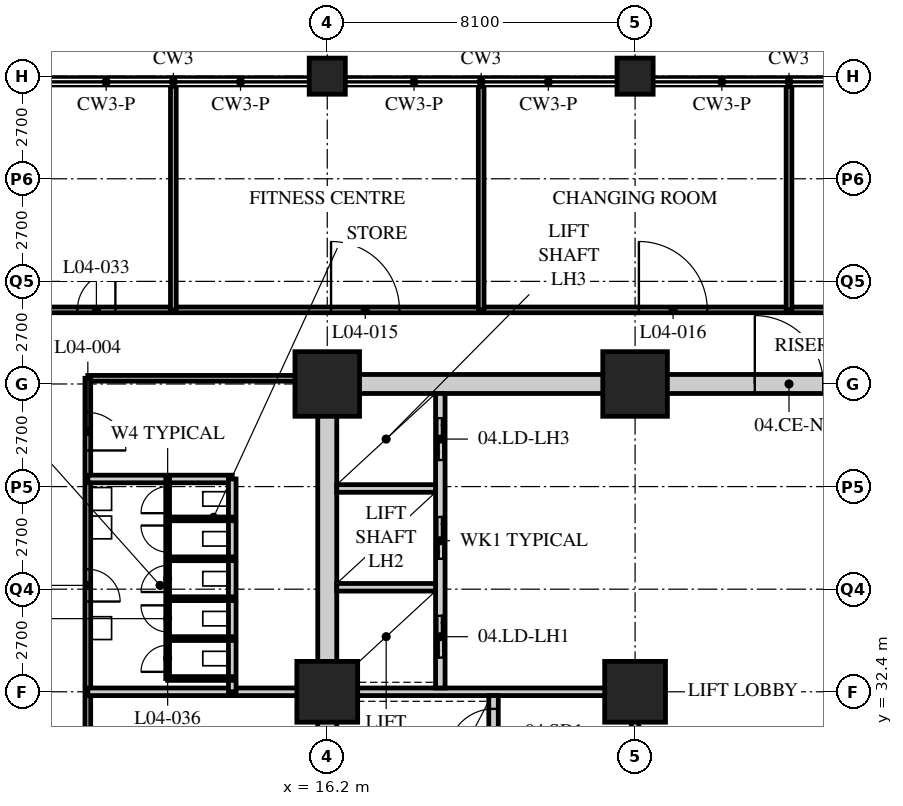
"""IFC4 building model, lengths in metres.
Left out: names, types, materials, properties, quantities, classifications, styles, units other than length and angle.
Written with IfcOpenShell. Run it as: python <this file> out.ifc"""

import sys

from ifc_helpers import new_model, si_unit, direction, frame, frame_2d, origin, origin_2d, place, context, subcontext, project, spatial, rectangle, hollow_rectangle, extrude, element, fill, save


model = new_model("IFC4")
c1 = context("Model", 3, precision=1e-05, world=origin(), true_north=direction((0.0, 1.0)))
c2 = subcontext(c1, "Body", "Model", "MODEL_VIEW")
j1 = project(units=[si_unit("LENGTHUNIT", "METRE"), si_unit("PLANEANGLEUNIT", "RADIAN")], contexts=[c1])
p1 = place(None, origin())
s1 = spatial("IfcSite", under=j1, at=p1, CompositionType="ELEMENT")
p2 = place(p1, origin())
s2 = spatial("IfcBuilding", under=s1, at=p2, CompositionType="ELEMENT")
p3 = place(p2, frame((0.0, 0.0, 22.2)))
s3 = spatial("IfcBuildingStorey", under=s2, at=p3, CompositionType="ELEMENT", Elevation=22.2)
p4 = place(p3, frame((16.2, 32.4, 0.0), z_axis=(0.0, 0.0, 1.0), x_axis=(1.0, 0.0, 0.0)))
e1 = element("IfcColumn", 1, at=p4, inside=s3, PredefinedType="COLUMN", context=c2, shape_type="SweptSolid", body=[
    extrude(hollow_rectangle(XDim=1.6, YDim=1.6, WallThickness=0.15, at=origin_2d()), origin(), (0.0, 0.0, 1.0), 5.4),
])
p5 = place(p3, frame((16.2, 40.5, 0.0), z_axis=(0.0, 0.0, 1.0), x_axis=(1.0, 0.0, 0.0)))
e2 = element("IfcColumn", 2, at=p5, inside=s3, PredefinedType="COLUMN", context=c2, shape_type="SweptSolid", body=[
    extrude(hollow_rectangle(XDim=1.7, YDim=1.7, WallThickness=0.16, at=origin_2d()), origin(), (0.0, 0.0, 1.0), 5.4),
])
p6 = place(p3, frame((16.2, 48.6, 0.0), z_axis=(0.0, 0.0, 1.0), x_axis=(1.0, 0.0, 0.0)))
e3 = element("IfcColumn", 3, at=p6, inside=s3, PredefinedType="COLUMN", context=c2, shape_type="SweptSolid", body=[
    extrude(hollow_rectangle(XDim=0.95, YDim=0.95, WallThickness=0.1, at=origin_2d()), origin(), (0.0, 0.0, 1.0), 5.4),
])
p7 = place(p3, frame((24.3, 32.4, 0.0), z_axis=(0.0, 0.0, 1.0), x_axis=(1.0, 0.0, 0.0)))
e4 = element("IfcColumn", 4, at=p7, inside=s3, PredefinedType="COLUMN", context=c2, shape_type="SweptSolid", body=[
    extrude(hollow_rectangle(XDim=1.6, YDim=1.6, WallThickness=0.15, at=origin_2d()), origin(), (0.0, 0.0, 1.0), 5.4),
])
p8 = place(p3, frame((24.3, 40.5, 0.0), z_axis=(0.0, 0.0, 1.0), x_axis=(1.0, 0.0, 0.0)))
e5 = element("IfcColumn", 5, at=p8, inside=s3, PredefinedType="COLUMN", context=c2, shape_type="SweptSolid", body=[
    extrude(hollow_rectangle(XDim=1.7, YDim=1.7, WallThickness=0.16, at=origin_2d()), origin(), (0.0, 0.0, 1.0), 5.4),
])
p9 = place(p3, frame((24.3, 48.6, 0.0), z_axis=(0.0, 0.0, 1.0), x_axis=(1.0, 0.0, 0.0)))
e6 = element("IfcColumn", 6, at=p9, inside=s3, PredefinedType="COLUMN", context=c2, shape_type="SweptSolid", body=[
    extrude(hollow_rectangle(XDim=0.95, YDim=0.95, WallThickness=0.1, at=origin_2d()), origin(), (0.0, 0.0, 1.0), 5.4),
])
p10 = place(p3, frame((8.1, 42.45, 0.0), z_axis=(0.0, 0.0, 1.0), x_axis=(1.0, 0.0, 0.0)))
e7 = element("IfcWall", 7, at=p10, inside=s3, PredefinedType="PARTITIONING", context=c2, shape_type="SweptSolid", body=[
    extrude(rectangle(XDim=40.5, YDim=0.15, at=frame_2d((20.25, 0.0))), origin(), (0.0, 0.0, 1.0), 5.19),
])
p11 = place(p10, frame((8.2, 0.0, 0.0)))
e8 = element("IfcOpeningElement", 8, at=p11, cuts=e7, PredefinedType="OPENING", context=c2, shape_type="SweptSolid", body=[
    extrude(rectangle(XDim=1.8, YDim=2.4, at=frame_2d((0.9, 1.2))), frame((0.0, 0.085, 0.0), z_axis=(0.0, -1.0, 0.0), x_axis=(1.0, 0.0, 0.0)), (0.0, 0.0, 1.0), 0.17),
])
p12 = place(p10, frame((16.3, 0.0, 0.0)))
e9 = element("IfcOpeningElement", 9, at=p12, cuts=e7, PredefinedType="OPENING", context=c2, shape_type="SweptSolid", body=[
    extrude(rectangle(XDim=1.8, YDim=2.4, at=frame_2d((0.9, 1.2))), frame((0.0, 0.085, 0.0), z_axis=(0.0, -1.0, 0.0), x_axis=(1.0, 0.0, 0.0)), (0.0, 0.0, 1.0), 0.17),
])
p13 = place(p10, frame((24.4, 0.0, 0.0)))
e10 = element("IfcOpeningElement", 10, at=p13, cuts=e7, PredefinedType="OPENING", context=c2, shape_type="SweptSolid", body=[
    extrude(rectangle(XDim=1.8, YDim=2.4, at=frame_2d((0.9, 1.2))), frame((0.0, 0.085, 0.0), z_axis=(0.0, -1.0, 0.0), x_axis=(1.0, 0.0, 0.0)), (0.0, 0.0, 1.0), 0.17),
])
p14 = place(p10, frame((32.5, 0.0, 0.0)))
e11 = element("IfcOpeningElement", 11, at=p14, cuts=e7, PredefinedType="OPENING", context=c2, shape_type="SweptSolid", body=[
    extrude(rectangle(XDim=1.8, YDim=2.4, at=frame_2d((0.9, 1.2))), frame((0.0, 0.085, 0.0), z_axis=(0.0, -1.0, 0.0), x_axis=(1.0, 0.0, 0.0)), (0.0, 0.0, 1.0), 0.17),
])
p15 = place(p10, frame((37.975, 0.0, 0.0)))
e12 = element("IfcOpeningElement", 12, at=p15, cuts=e7, PredefinedType="OPENING", context=c2, shape_type="SweptSolid", body=[
    extrude(rectangle(XDim=1.0, YDim=2.1, at=frame_2d((0.5, 1.05))), frame((0.0, 0.085, 0.0), z_axis=(0.0, -1.0, 0.0), x_axis=(1.0, 0.0, 0.0)), (0.0, 0.0, 1.0), 0.17),
])
p16 = place(p10, frame((1.525, 0.0, 0.0)))
e13 = element("IfcOpeningElement", 13, at=p16, cuts=e7, PredefinedType="OPENING", context=c2, shape_type="SweptSolid", body=[
    extrude(rectangle(XDim=1.0, YDim=2.1, at=frame_2d((0.5, 1.05))), frame((0.0, 0.085, 0.0), z_axis=(0.0, -1.0, 0.0), x_axis=(1.0, 0.0, 0.0)), (0.0, 0.0, 1.0), 0.17),
])
p17 = place(p3, frame((16.068, 40.65, 0.0), z_axis=(0.0, 0.0, 1.0), x_axis=(-1.0, 0.0, 0.0)))
e14 = element("IfcWall", 14, at=p17, inside=s3, PredefinedType="PARTITIONING", context=c2, shape_type="SweptSolid", body=[
    extrude(rectangle(XDim=6.168, YDim=0.15, at=frame_2d((3.084, 0.0))), origin(), (0.0, 0.0, 1.0), 4.428),
])
p18 = place(p3, frame((9.9, 40.65, 0.0), z_axis=(0.0, 0.0, 1.0), x_axis=(0.0, -1.0, 0.0)))
e15 = element("IfcWall", 15, at=p18, inside=s3, PredefinedType="PARTITIONING", context=c2, shape_type="SweptSolid", body=[
    extrude(rectangle(XDim=30.75, YDim=0.15, at=frame_2d((15.375, 0.0))), origin(), (0.0, 0.0, 1.0), 5.19),
])
p19 = place(p18, frame((13.525, 0.0, 0.0)))
e16 = element("IfcOpeningElement", 16, at=p19, cuts=e15, PredefinedType="OPENING", context=c2, shape_type="SweptSolid", body=[
    extrude(rectangle(XDim=0.85, YDim=2.1, at=frame_2d((0.425, 1.05))), frame((0.0, 0.085, 0.0), z_axis=(0.0, -1.0, 0.0), x_axis=(1.0, 0.0, 0.0)), (0.0, 0.0, 1.0), 0.17),
])
p20 = place(p18, frame((9.4, 0.0, 0.0)))
e17 = element("IfcOpeningElement", 17, at=p20, cuts=e15, PredefinedType="OPENING", context=c2, shape_type="SweptSolid", body=[
    extrude(rectangle(XDim=1.0, YDim=2.1, at=frame_2d((0.5, 1.05))), frame((0.0, 0.085, 0.0), z_axis=(0.0, -1.0, 0.0), x_axis=(1.0, 0.0, 0.0)), (0.0, 0.0, 1.0), 0.17),
])
p21 = place(p18, frame((5.025, 0.0, 0.0)))
e18 = element("IfcOpeningElement", 18, at=p21, cuts=e15, PredefinedType="OPENING", context=c2, shape_type="SweptSolid", body=[
    extrude(rectangle(XDim=0.85, YDim=2.1, at=frame_2d((0.425, 1.05))), frame((0.0, 0.085, 0.0), z_axis=(0.0, -1.0, 0.0), x_axis=(1.0, 0.0, 0.0)), (0.0, 0.0, 1.0), 0.17),
])
p22 = place(p18, frame((0.9, 0.0, 0.0)))
e19 = element("IfcOpeningElement", 19, at=p22, cuts=e15, PredefinedType="OPENING", context=c2, shape_type="SweptSolid", body=[
    extrude(rectangle(XDim=1.0, YDim=2.1, at=frame_2d((0.5, 1.05))), frame((0.0, 0.085, 0.0), z_axis=(0.0, -1.0, 0.0), x_axis=(1.0, 0.0, 0.0)), (0.0, 0.0, 1.0), 0.17),
])
p23 = place(p3, frame((9.9, 32.4, 0.0), z_axis=(0.0, 0.0, 1.0), x_axis=(1.0, 0.0, 0.0)))
e20 = element("IfcWall", 20, at=p23, inside=s3, PredefinedType="SOLIDWALL", context=c2, shape_type="SweptSolid", body=[
    extrude(rectangle(XDim=6.3, YDim=0.2, at=frame_2d((3.15, 0.0))), origin(), (0.0, 0.0, 1.0), 4.428),
])
p24 = place(p3, frame((9.9, 38.0, 0.0), z_axis=(0.0, 0.0, 1.0), x_axis=(1.0, 0.0, 0.0)))
e21 = element("IfcWall", 21, at=p24, inside=s3, PredefinedType="SOLIDWALL", context=c2, shape_type="SweptSolid", body=[
    extrude(rectangle(XDim=3.8, YDim=0.2, at=frame_2d((1.9, 0.0))), origin(), (0.0, 0.0, 1.0), 5.19),
])
p25 = place(p3, frame((13.7, 32.4, 0.0), z_axis=(0.0, 0.0, 1.0), x_axis=(0.0, 1.0, 0.0)))
e22 = element("IfcWall", 22, at=p25, inside=s3, PredefinedType="SOLIDWALL", context=c2, shape_type="SweptSolid", body=[
    extrude(rectangle(XDim=5.6, YDim=0.2, at=frame_2d((2.8, 0.0))), origin(), (0.0, 0.0, 1.0), 5.19),
])
for number, where, z_axis, x_axis in (
    (23, (20.25, 42.45, 0.0), (0.0, 0.0, 1.0), (0.0, 1.0, 0.0)),
    (24, (28.35, 42.45, 0.0), (0.0, 0.0, 1.0), (0.0, 1.0, 0.0)),
    (25, (12.15, 42.45, 0.0), (0.0, 0.0, 1.0), (0.0, 1.0, 0.0)),
):
    element("IfcWall", number, at=place(p3, frame(where, z_axis=z_axis, x_axis=x_axis)), inside=s3, PredefinedType="PARTITIONING", context=c2, shape_type="SweptSolid", body=[
        extrude(rectangle(XDim=5.885, YDim=0.15, at=frame_2d((2.942, 0.0))), origin(), (0.0, 0.0, 1.0), 5.19),
    ])
p26 = place(p3, frame((12.0, 32.75, 0.0), z_axis=(0.0, 0.0, 1.0), x_axis=(0.0, 1.0, 0.0)))
e26 = element("IfcWall", 26, at=p26, inside=s3, PredefinedType="PARTITIONING", context=c2, shape_type="SweptSolid", body=[
    extrude(rectangle(XDim=5.25, YDim=0.1, at=frame_2d((2.625, 0.0))), origin(), (0.0, 0.0, 1.0), 5.19),
])
p27 = place(p26, frame((0.175, 0.0, 0.0)))
e27 = element("IfcOpeningElement", 27, at=p27, cuts=e26, PredefinedType="OPENING", context=c2, shape_type="SweptSolid", body=[
    extrude(rectangle(XDim=0.7, YDim=2.0, at=frame_2d((0.35, 1.0))), frame((0.0, 0.06, 0.0), z_axis=(0.0, -1.0, 0.0), x_axis=(1.0, 0.0, 0.0)), (0.0, 0.0, 1.0), 0.12),
])
p28 = place(p26, frame((1.225, 0.0, 0.0)))
e28 = element("IfcOpeningElement", 28, at=p28, cuts=e26, PredefinedType="OPENING", context=c2, shape_type="SweptSolid", body=[
    extrude(rectangle(XDim=0.7, YDim=2.0, at=frame_2d((0.35, 1.0))), frame((0.0, 0.06, 0.0), z_axis=(0.0, -1.0, 0.0), x_axis=(1.0, 0.0, 0.0)), (0.0, 0.0, 1.0), 0.12),
])
p29 = place(p26, frame((2.275, 0.0, 0.0)))
e29 = element("IfcOpeningElement", 29, at=p29, cuts=e26, PredefinedType="OPENING", context=c2, shape_type="SweptSolid", body=[
    extrude(rectangle(XDim=0.7, YDim=2.0, at=frame_2d((0.35, 1.0))), frame((0.0, 0.06, 0.0), z_axis=(0.0, -1.0, 0.0), x_axis=(1.0, 0.0, 0.0)), (0.0, 0.0, 1.0), 0.12),
])
p30 = place(p26, frame((3.325, 0.0, 0.0)))
e30 = element("IfcOpeningElement", 30, at=p30, cuts=e26, PredefinedType="OPENING", context=c2, shape_type="SweptSolid", body=[
    extrude(rectangle(XDim=0.7, YDim=2.0, at=frame_2d((0.35, 1.0))), frame((0.0, 0.06, 0.0), z_axis=(0.0, -1.0, 0.0), x_axis=(1.0, 0.0, 0.0)), (0.0, 0.0, 1.0), 0.12),
])
p31 = place(p26, frame((4.35, 0.0, 0.0)))
e31 = element("IfcOpeningElement", 31, at=p31, cuts=e26, PredefinedType="OPENING", context=c2, shape_type="SweptSolid", body=[
    extrude(rectangle(XDim=0.7, YDim=2.0, at=frame_2d((0.35, 1.0))), frame((0.0, 0.06, 0.0), z_axis=(0.0, -1.0, 0.0), x_axis=(1.0, 0.0, 0.0)), (0.0, 0.0, 1.0), 0.12),
])
for number, where, z_axis, x_axis in (
    (32, (12.0, 32.75, 0.0), (0.0, 0.0, 1.0), (1.0, 0.0, 0.0)),
    (33, (12.0, 33.8, 0.0), (0.0, 0.0, 1.0), (1.0, 0.0, 0.0)),
    (34, (12.0, 34.85, 0.0), (0.0, 0.0, 1.0), (1.0, 0.0, 0.0)),
    (35, (12.0, 35.9, 0.0), (0.0, 0.0, 1.0), (1.0, 0.0, 0.0)),
    (36, (12.0, 36.95, 0.0), (0.0, 0.0, 1.0), (1.0, 0.0, 0.0)),
):
    element("IfcWall", number, at=place(p3, frame(where, z_axis=z_axis, x_axis=x_axis)), inside=s3, PredefinedType="PARTITIONING", context=c2, shape_type="SweptSolid", body=[
        extrude(rectangle(XDim=1.7, YDim=0.1, at=frame_2d((0.85, 0.0))), origin(), (0.0, 0.0, 1.0), 5.19),
    ])
p32 = place(p3, frame((15.95, 40.5, 0.0), z_axis=(0.0, 0.0, 1.0), x_axis=(1.0, 0.0, 0.0)))
e37 = element("IfcWall", 37, at=p32, inside=s3, PredefinedType="SOLIDWALL", context=c2, shape_type="SweptSolid", body=[
    extrude(rectangle(XDim=24.8, YDim=0.5, at=frame_2d((12.4, 0.0))), origin(), (0.0, 0.0, 1.0), 4.428),
])
p33 = place(p32, frame((11.5, 0.0, 0.0)))
e38 = element("IfcOpeningElement", 38, at=p33, cuts=e37, PredefinedType="OPENING", context=c2, shape_type="SweptSolid", body=[
    extrude(rectangle(XDim=1.8, YDim=2.4, at=frame_2d((0.9, 1.2))), frame((0.0, 0.26, 0.0), z_axis=(0.0, -1.0, 0.0), x_axis=(1.0, 0.0, 0.0)), (0.0, 0.0, 1.0), 0.52),
])
p34 = place(p3, frame((16.2, 24.55, 0.0), z_axis=(0.0, 0.0, 1.0), x_axis=(0.0, 1.0, 0.0)))
e39 = element("IfcWall", 39, at=p34, inside=s3, PredefinedType="SOLIDWALL", context=c2, shape_type="SweptSolid", body=[
    extrude(rectangle(XDim=15.7, YDim=0.5, at=frame_2d((7.85, 0.0))), origin(), (0.0, 0.0, 1.0), 4.428),
])
p35 = place(p3, frame((16.45, 32.4, 0.0), z_axis=(0.0, 0.0, 1.0), x_axis=(1.0, 0.0, 0.0)))
e40 = element("IfcWall", 40, at=p35, inside=s3, PredefinedType="SOLIDWALL", context=c2, shape_type="SweptSolid", body=[
    extrude(rectangle(XDim=7.95, YDim=0.2, at=frame_2d((3.975, 0.0))), origin(), (0.0, 0.0, 1.0), 4.428),
])
p36 = place(p3, frame((24.3, 24.55, 0.0), z_axis=(0.0, 0.0, 1.0), x_axis=(0.0, 1.0, 0.0)))
e41 = element("IfcWall", 41, at=p36, inside=s3, PredefinedType="SOLIDWALL", context=c2, shape_type="SweptSolid", body=[
    extrude(rectangle(XDim=7.75, YDim=0.2, at=frame_2d((3.875, 0.0))), origin(), (0.0, 0.0, 1.0), 4.428),
])
p37 = place(p36, frame((4.6, 0.0, 0.0)))
e42 = element("IfcOpeningElement", 42, at=p37, cuts=e41, PredefinedType="OPENING", context=c2, shape_type="SweptSolid", body=[
    extrude(rectangle(XDim=1.2, YDim=2.1, at=frame_2d((0.6, 1.05))), frame((0.0, 0.11, 0.0), z_axis=(0.0, -1.0, 0.0), x_axis=(1.0, 0.0, 0.0)), (0.0, 0.0, 1.0), 0.22),
])
p38 = place(p3, frame((20.575, 24.55, 0.0), z_axis=(0.0, 0.0, 1.0), x_axis=(0.0, 1.0, 0.0)))
e43 = element("IfcWall", 43, at=p38, inside=s3, PredefinedType="SOLIDWALL", context=c2, shape_type="SweptSolid", body=[
    extrude(rectangle(XDim=7.75, YDim=0.25, at=frame_2d((3.875, 0.0))), origin(), (0.0, 0.0, 1.0), 5.19),
])
p39 = place(p38, frame((6.2, 0.0, 0.0)))
e44 = element("IfcOpeningElement", 44, at=p39, cuts=e43, PredefinedType="OPENING", context=c2, shape_type="SweptSolid", body=[
    extrude(rectangle(XDim=1.2, YDim=2.1, at=frame_2d((0.6, 1.05))), frame((0.0, 0.135, 0.0), z_axis=(0.0, -1.0, 0.0), x_axis=(1.0, 0.0, 0.0)), (0.0, 0.0, 1.0), 0.27),
])
p40 = place(p3, frame((19.175, 32.5, 0.0), z_axis=(0.0, 0.0, 1.0), x_axis=(0.0, 1.0, 0.0)))
e45 = element("IfcWall", 45, at=p40, inside=s3, PredefinedType="SOLIDWALL", context=c2, shape_type="SweptSolid", body=[
    extrude(rectangle(XDim=7.75, YDim=0.25, at=frame_2d((3.875, 0.0))), origin(), (0.0, 0.0, 1.0), 5.19),
])
p41 = place(p40, frame((0.8, 0.0, 0.0)))
e46 = element("IfcOpeningElement", 46, at=p41, cuts=e45, PredefinedType="OPENING", context=c2, shape_type="SweptSolid", body=[
    extrude(rectangle(XDim=1.1, YDim=2.4, at=frame_2d((0.55, 1.2))), frame((0.0, 0.135, 0.0), z_axis=(0.0, -1.0, 0.0), x_axis=(1.0, 0.0, 0.0)), (0.0, 0.0, 1.0), 0.27),
])
p42 = place(p40, frame((3.4, 0.0, 0.0)))
e47 = element("IfcOpeningElement", 47, at=p42, cuts=e45, PredefinedType="OPENING", context=c2, shape_type="SweptSolid", body=[
    extrude(rectangle(XDim=1.1, YDim=2.4, at=frame_2d((0.55, 1.2))), frame((0.0, 0.135, 0.0), z_axis=(0.0, -1.0, 0.0), x_axis=(1.0, 0.0, 0.0)), (0.0, 0.0, 1.0), 0.27),
])
p43 = place(p40, frame((6.0, 0.0, 0.0)))
e48 = element("IfcOpeningElement", 48, at=p43, cuts=e45, PredefinedType="OPENING", context=c2, shape_type="SweptSolid", body=[
    extrude(rectangle(XDim=1.1, YDim=2.4, at=frame_2d((0.55, 1.2))), frame((0.0, 0.135, 0.0), z_axis=(0.0, -1.0, 0.0), x_axis=(1.0, 0.0, 0.0)), (0.0, 0.0, 1.0), 0.27),
])
for number, where, z_axis, x_axis in (
    (49, (16.45, 35.15, 0.0), (0.0, 0.0, 1.0), (1.0, 0.0, 0.0)),
    (50, (16.45, 37.75, 0.0), (0.0, 0.0, 1.0), (1.0, 0.0, 0.0)),
):
    element("IfcWall", number, at=place(p3, frame(where, z_axis=z_axis, x_axis=x_axis)), inside=s3, PredefinedType="SOLIDWALL", context=c2, shape_type="SweptSolid", body=[
        extrude(rectangle(XDim=2.6, YDim=0.2, at=frame_2d((1.3, 0.0))), origin(), (0.0, 0.0, 1.0), 5.19),
    ])
p44 = place(p21, origin())
e51 = element("IfcDoor", 51, at=p44, inside=s3, OperationType="SINGLE_SWING_RIGHT", PredefinedType="DOOR", context=c2, shape_type="SweptSolid", body=[
    extrude(rectangle(XDim=0.85, YDim=2.1, at=frame_2d((0.425, 1.05))), frame((0.0, 0.025, 0.0), z_axis=(0.0, -1.0, 0.0), x_axis=(1.0, 0.0, 0.0)), (0.0, 0.0, 1.0), 0.05),
])
fill(e18, e51)
p45 = place(p22, origin())
e52 = element("IfcDoor", 52, at=p45, inside=s3, OperationType="SINGLE_SWING_RIGHT", PredefinedType="DOOR", context=c2, shape_type="SweptSolid", body=[
    extrude(rectangle(XDim=1.0, YDim=2.1, at=frame_2d((0.5, 1.05))), frame((0.0, 0.025, 0.0), z_axis=(0.0, -1.0, 0.0), x_axis=(1.0, 0.0, 0.0)), (0.0, 0.0, 1.0), 0.05),
])
fill(e19, e52)
p46 = place(p11, origin())
e53 = element("IfcDoor", 53, at=p46, inside=s3, OperationType="DOUBLE_DOOR_SINGLE_SWING", PredefinedType="DOOR", context=c2, shape_type="SweptSolid", body=[
    extrude(rectangle(XDim=1.8, YDim=2.4, at=frame_2d((0.9, 1.2))), frame((0.0, 0.025, 0.0), z_axis=(0.0, -1.0, 0.0), x_axis=(1.0, 0.0, 0.0)), (0.0, 0.0, 1.0), 0.05),
])
fill(e8, e53)
p47 = place(p12, origin())
e54 = element("IfcDoor", 54, at=p47, inside=s3, OperationType="DOUBLE_DOOR_SINGLE_SWING", PredefinedType="DOOR", context=c2, shape_type="SweptSolid", body=[
    extrude(rectangle(XDim=1.8, YDim=2.4, at=frame_2d((0.9, 1.2))), frame((0.0, 0.025, 0.0), z_axis=(0.0, -1.0, 0.0), x_axis=(1.0, 0.0, 0.0)), (0.0, 0.0, 1.0), 0.05),
])
fill(e9, e54)
p48 = place(p16, origin())
e55 = element("IfcDoor", 55, at=p48, inside=s3, OperationType="SINGLE_SWING_RIGHT", PredefinedType="DOOR", context=c2, shape_type="SweptSolid", body=[
    extrude(rectangle(XDim=1.0, YDim=2.1, at=frame_2d((0.5, 1.05))), frame((0.0, 0.025, 0.0), z_axis=(0.0, -1.0, 0.0), x_axis=(1.0, 0.0, 0.0)), (0.0, 0.0, 1.0), 0.05),
])
fill(e13, e55)
p49 = place(p27, origin())
e56 = element("IfcDoor", 56, at=p49, inside=s3, OperationType="SINGLE_SWING_LEFT", PredefinedType="DOOR", context=c2, shape_type="SweptSolid", body=[
    extrude(rectangle(XDim=0.7, YDim=2.0, at=frame_2d((0.35, 1.0))), frame((0.0, 0.025, 0.0), z_axis=(0.0, -1.0, 0.0), x_axis=(1.0, 0.0, 0.0)), (0.0, 0.0, 1.0), 0.05),
])
fill(e27, e56)
p50 = place(p28, origin())
e57 = element("IfcDoor", 57, at=p50, inside=s3, OperationType="SINGLE_SWING_RIGHT", PredefinedType="DOOR", context=c2, shape_type="SweptSolid", body=[
    extrude(rectangle(XDim=0.7, YDim=2.0, at=frame_2d((0.35, 1.0))), frame((0.0, 0.025, 0.0), z_axis=(0.0, -1.0, 0.0), x_axis=(1.0, 0.0, 0.0)), (0.0, 0.0, 1.0), 0.05),
])
fill(e28, e57)
p51 = place(p29, origin())
e58 = element("IfcDoor", 58, at=p51, inside=s3, OperationType="SINGLE_SWING_LEFT", PredefinedType="DOOR", context=c2, shape_type="SweptSolid", body=[
    extrude(rectangle(XDim=0.7, YDim=2.0, at=frame_2d((0.35, 1.0))), frame((0.0, 0.025, 0.0), z_axis=(0.0, -1.0, 0.0), x_axis=(1.0, 0.0, 0.0)), (0.0, 0.0, 1.0), 0.05),
])
fill(e29, e58)
p52 = place(p30, origin())
e59 = element("IfcDoor", 59, at=p52, inside=s3, OperationType="SINGLE_SWING_RIGHT", PredefinedType="DOOR", context=c2, shape_type="SweptSolid", body=[
    extrude(rectangle(XDim=0.7, YDim=2.0, at=frame_2d((0.35, 1.0))), frame((0.0, 0.025, 0.0), z_axis=(0.0, -1.0, 0.0), x_axis=(1.0, 0.0, 0.0)), (0.0, 0.0, 1.0), 0.05),
])
fill(e30, e59)
p53 = place(p31, origin())
e60 = element("IfcDoor", 60, at=p53, inside=s3, OperationType="SINGLE_SWING_LEFT", PredefinedType="DOOR", context=c2, shape_type="SweptSolid", body=[
    extrude(rectangle(XDim=0.7, YDim=2.0, at=frame_2d((0.35, 1.0))), frame((0.0, 0.025, 0.0), z_axis=(0.0, -1.0, 0.0), x_axis=(1.0, 0.0, 0.0)), (0.0, 0.0, 1.0), 0.05),
])
fill(e31, e60)
p54 = place(p39, origin())
e61 = element("IfcDoor", 61, at=p54, inside=s3, OperationType="SINGLE_SWING_LEFT", PredefinedType="DOOR", context=c2, shape_type="SweptSolid", body=[
    extrude(rectangle(XDim=1.2, YDim=2.1, at=frame_2d((0.6, 1.05))), frame((0.0, 0.025, 0.0), z_axis=(0.0, -1.0, 0.0), x_axis=(1.0, 0.0, 0.0)), (0.0, 0.0, 1.0), 0.05),
])
fill(e44, e61)
p55 = place(p41, origin())
e62 = element("IfcDoor", 62, at=p55, inside=s3, OperationType="DOUBLE_DOOR_SLIDING", PredefinedType="DOOR", context=c2, shape_type="SweptSolid", body=[
    extrude(rectangle(XDim=1.1, YDim=2.4, at=frame_2d((0.55, 1.2))), frame((0.0, 0.025, 0.0), z_axis=(0.0, -1.0, 0.0), x_axis=(1.0, 0.0, 0.0)), (0.0, 0.0, 1.0), 0.05),
])
fill(e46, e62)
p56 = place(p42, origin())
e63 = element("IfcDoor", 63, at=p56, inside=s3, OperationType="DOUBLE_DOOR_SLIDING", PredefinedType="DOOR", context=c2, shape_type="SweptSolid", body=[
    extrude(rectangle(XDim=1.1, YDim=2.4, at=frame_2d((0.55, 1.2))), frame((0.0, 0.025, 0.0), z_axis=(0.0, -1.0, 0.0), x_axis=(1.0, 0.0, 0.0)), (0.0, 0.0, 1.0), 0.05),
])
fill(e47, e63)
p57 = place(p43, origin())
e64 = element("IfcDoor", 64, at=p57, inside=s3, OperationType="DOUBLE_DOOR_SLIDING", PredefinedType="DOOR", context=c2, shape_type="SweptSolid", body=[
    extrude(rectangle(XDim=1.1, YDim=2.4, at=frame_2d((0.55, 1.2))), frame((0.0, 0.025, 0.0), z_axis=(0.0, -1.0, 0.0), x_axis=(1.0, 0.0, 0.0)), (0.0, 0.0, 1.0), 0.05),
])
fill(e48, e64)
p58 = place(p33, origin())
e65 = element("IfcDoor", 65, at=p58, inside=s3, OperationType="DOUBLE_DOOR_SINGLE_SWING", PredefinedType="DOOR", context=c2, shape_type="SweptSolid", body=[
    extrude(rectangle(XDim=1.8, YDim=2.4, at=frame_2d((0.9, 1.2))), frame((0.0, 0.025, 0.0), z_axis=(0.0, -1.0, 0.0), x_axis=(1.0, 0.0, 0.0)), (0.0, 0.0, 1.0), 0.05),
])
fill(e38, e65)
save(model, sys.argv[1])
